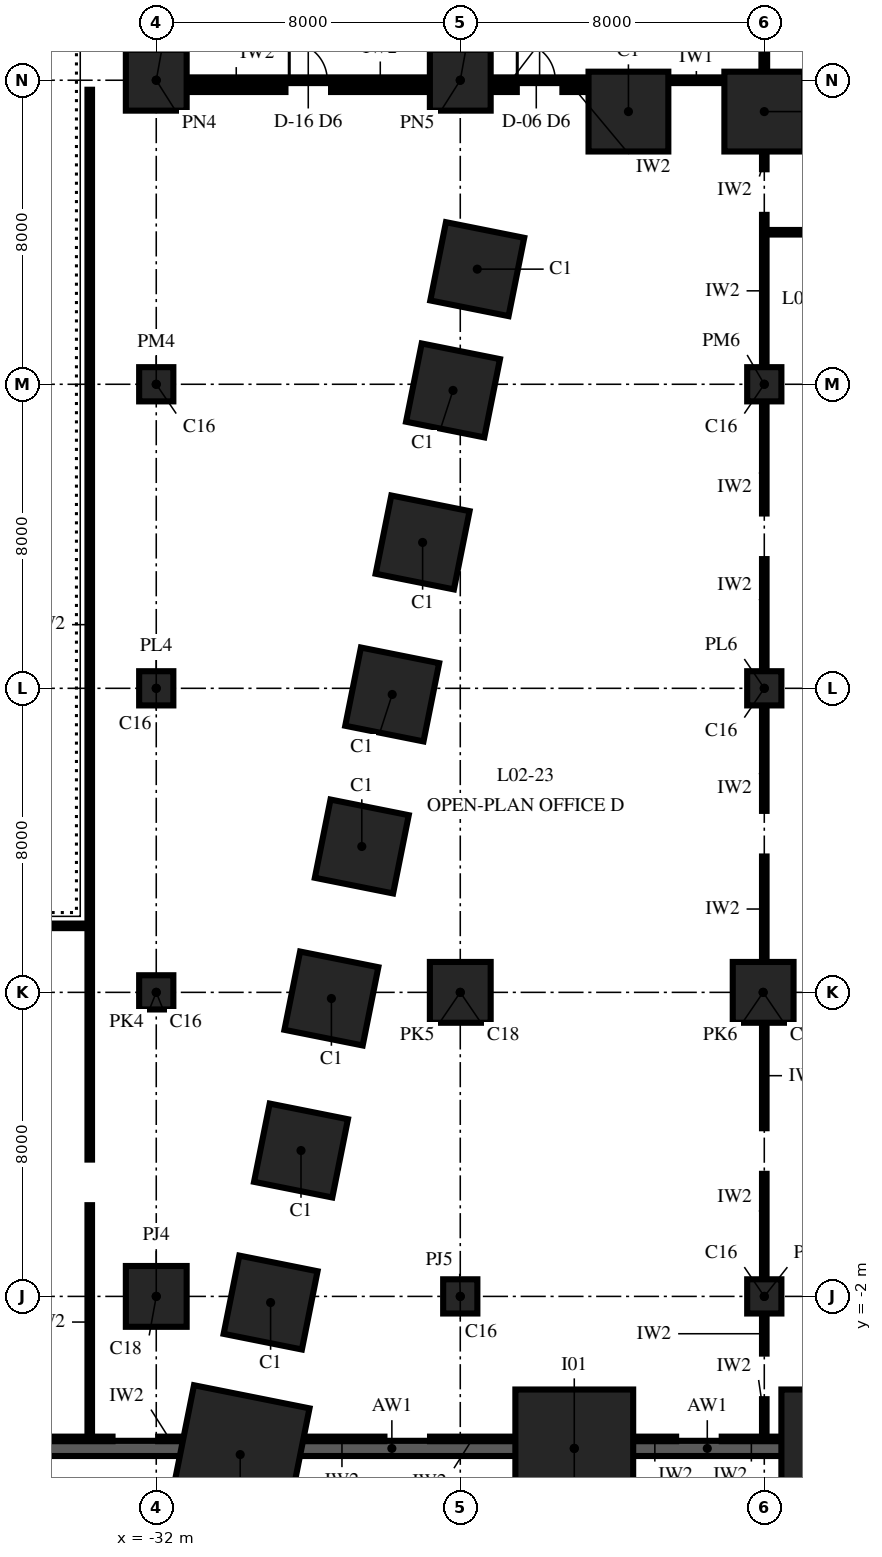
"""IFC4 building model, lengths in metres.
Left out: names, types, materials, properties, quantities, classifications, styles, units other than length and angle.
Written with IfcOpenShell. Run it as: python <this file> out.ifc"""

import sys

from ifc_helpers import new_model, si_unit, direction, frame, frame_2d, origin, origin_2d, place, context, subcontext, project, spatial, rectangle, extrude, element, fill, save


model = new_model("IFC4")
c1 = context("Model", 3, precision=1e-05, world=origin(), true_north=direction((0.0, 1.0)))
c2 = subcontext(c1, "Body", "Model", "MODEL_VIEW")
j1 = project(units=[si_unit("LENGTHUNIT", "METRE"), si_unit("PLANEANGLEUNIT", "RADIAN")], contexts=[c1])
p1 = place(None, origin())
s1 = spatial("IfcSite", under=j1, at=p1, CompositionType="ELEMENT")
p2 = place(p1, origin())
s2 = spatial("IfcBuilding", under=s1, at=p2, CompositionType="ELEMENT")
p3 = place(p2, frame((0.0, 0.0, 12.0)))
s3 = spatial("IfcBuildingStorey", under=s2, at=p3, CompositionType="ELEMENT", Elevation=12.0)
for number, where, z_axis, x_axis in (
    (1, (-16.0, 29.175, 0.0), (0.0, 0.0, 1.0), (-1.0, 0.0, 0.0)),
    (2, (-19.575, 29.175, 0.0), (0.0, 0.0, 1.0), (-1.0, 0.0, 0.0)),
    (3, (-23.553, 25.029, 0.0), (0.0, 0.0, 1.0), (-0.196, -0.981, 0.0)),
    (4, (-24.191, 21.838, 0.0), (0.0, 0.0, 1.0), (-0.196, -0.981, 0.0)),
    (5, (-24.991, 17.838, 0.0), (0.0, 0.0, 1.0), (-0.196, -0.981, 0.0)),
    (6, (-25.791, 13.838, 0.0), (0.0, 0.0, 1.0), (-0.196, -0.981, 0.0)),
    (7, (-26.591, 9.838, 0.0), (0.0, 0.0, 1.0), (-0.196, -0.981, 0.0)),
    (8, (-27.391, 5.838, 0.0), (0.0, 0.0, 1.0), (-0.196, -0.981, 0.0)),
    (9, (-28.191, 1.838, 0.0), (0.0, 0.0, 1.0), (-0.196, -0.981, 0.0)),
    (10, (-28.991, -2.162, 0.0), (0.0, 0.0, 1.0), (-0.196, -0.981, 0.0)),
):
    element("IfcColumn", number, at=place(p3, frame(where, z_axis=z_axis, x_axis=x_axis)), inside=s3, PredefinedType="COLUMN", context=c2, shape_type="SweptSolid", body=[
        extrude(rectangle(XDim=2.1, YDim=2.1, at=origin_2d()), origin(), (0.0, 0.0, 1.0), 7.0),
    ])
for number, where, z_axis, x_axis in (
    (11, (-29.791, -6.162, 0.0), (0.0, 0.0, 1.0), (-0.196, -0.981, 0.0)),
    (12, (-21.0, -6.0, 0.0), (0.0, 0.0, 1.0), (1.0, 0.0, 0.0)),
    (13, (-14.0, -6.0, 0.0), (0.0, 0.0, 1.0), (1.0, 0.0, 0.0)),
):
    element("IfcColumn", number, at=place(p3, frame(where, z_axis=z_axis, x_axis=x_axis)), inside=s3, PredefinedType="COLUMN", context=c2, shape_type="SweptSolid", body=[
        extrude(rectangle(XDim=3.1, YDim=3.1, at=origin_2d()), origin(), (0.0, 0.0, 1.0), 7.0),
    ])
p4 = place(p3, frame((-32.0, -2.0, 0.0), z_axis=(0.0, 0.0, 1.0), x_axis=(1.0, 0.0, 0.0)))
e14 = element("IfcColumn", 14, at=p4, inside=s3, PredefinedType="COLUMN", context=c2, shape_type="SweptSolid", body=[
    extrude(rectangle(XDim=1.6, YDim=1.6, at=origin_2d()), origin(), (0.0, 0.0, 1.0), 7.0),
])
for number, where, z_axis, x_axis in (
    (15, (-32.0, 6.0, 0.0), (0.0, 0.0, 1.0), (1.0, 0.0, 0.0)),
    (16, (-32.0, 14.0, 0.0), (0.0, 0.0, 1.0), (1.0, 0.0, 0.0)),
    (17, (-32.0, 22.0, 0.0), (0.0, 0.0, 1.0), (1.0, 0.0, 0.0)),
):
    element("IfcColumn", number, at=place(p3, frame(where, z_axis=z_axis, x_axis=x_axis)), inside=s3, PredefinedType="COLUMN", context=c2, shape_type="SweptSolid", body=[
        extrude(rectangle(XDim=0.9, YDim=0.9, at=origin_2d()), origin(), (0.0, 0.0, 1.0), 7.0),
    ])
p5 = place(p3, frame((-32.0, 30.0, 0.0), z_axis=(0.0, 0.0, 1.0), x_axis=(1.0, 0.0, 0.0)))
e18 = element("IfcColumn", 18, at=p5, inside=s3, PredefinedType="COLUMN", context=c2, shape_type="SweptSolid", body=[
    extrude(rectangle(XDim=1.6, YDim=1.6, at=origin_2d()), origin(), (0.0, 0.0, 1.0), 7.0),
])
p6 = place(p3, frame((-24.0, -2.0, 0.0), z_axis=(0.0, 0.0, 1.0), x_axis=(1.0, 0.0, 0.0)))
e19 = element("IfcColumn", 19, at=p6, inside=s3, PredefinedType="COLUMN", context=c2, shape_type="SweptSolid", body=[
    extrude(rectangle(XDim=0.9, YDim=0.9, at=origin_2d()), origin(), (0.0, 0.0, 1.0), 7.0),
])
for number, where, z_axis, x_axis in (
    (20, (-24.0, 6.0, 0.0), (0.0, 0.0, 1.0), (1.0, 0.0, 0.0)),
    (21, (-24.0, 30.0, 0.0), (0.0, 0.0, 1.0), (1.0, 0.0, 0.0)),
):
    element("IfcColumn", number, at=place(p3, frame(where, z_axis=z_axis, x_axis=x_axis)), inside=s3, PredefinedType="COLUMN", context=c2, shape_type="SweptSolid", body=[
        extrude(rectangle(XDim=1.6, YDim=1.6, at=origin_2d()), origin(), (0.0, 0.0, 1.0), 7.0),
    ])
p7 = place(p3, frame((-16.0, -2.0, 0.0), z_axis=(0.0, 0.0, 1.0), x_axis=(1.0, 0.0, 0.0)))
e22 = element("IfcColumn", 22, at=p7, inside=s3, PredefinedType="COLUMN", context=c2, shape_type="SweptSolid", body=[
    extrude(rectangle(XDim=0.9, YDim=0.9, at=origin_2d()), origin(), (0.0, 0.0, 1.0), 7.0),
])
p8 = place(p3, frame((-16.03, 6.0, 0.0), z_axis=(0.0, 0.0, 1.0), x_axis=(1.0, 0.0, 0.0)))
e23 = element("IfcColumn", 23, at=p8, inside=s3, PredefinedType="COLUMN", context=c2, shape_type="SweptSolid", body=[
    extrude(rectangle(XDim=1.6, YDim=1.6, at=origin_2d()), origin(), (0.0, 0.0, 1.0), 7.0),
])
for number, where, z_axis, x_axis in (
    (24, (-16.0, 14.0, 0.0), (0.0, 0.0, 1.0), (1.0, 0.0, 0.0)),
    (25, (-16.0, 22.0, 0.0), (0.0, 0.0, 1.0), (1.0, 0.0, 0.0)),
):
    element("IfcColumn", number, at=place(p3, frame(where, z_axis=z_axis, x_axis=x_axis)), inside=s3, PredefinedType="COLUMN", context=c2, shape_type="SweptSolid", body=[
        extrude(rectangle(XDim=0.9, YDim=0.9, at=origin_2d()), origin(), (0.0, 0.0, 1.0), 7.0),
    ])
p9 = place(p3, frame((-48.3, -6.0, 0.0), z_axis=(0.0, 0.0, 1.0), x_axis=(1.0, 0.0, 0.0)))
e26 = element("IfcWall", 26, at=p9, inside=s3, PredefinedType="SHEAR", context=c2, shape_type="SweptSolid", body=[
    extrude(rectangle(XDim=17.05, YDim=0.4, at=frame_2d((8.525, 0.0))), origin(), (0.0, 0.0, 1.0), 7.0),
])
p10 = place(p3, frame((-29.95, -6.0, 0.0), z_axis=(0.0, 0.0, 1.0), x_axis=(1.0, 0.0, 0.0)))
e27 = element("IfcWall", 27, at=p10, inside=s3, PredefinedType="SHEAR", context=c2, shape_type="SweptSolid", body=[
    extrude(rectangle(XDim=8.3, YDim=0.4, at=frame_2d((4.15, 0.0))), origin(), (0.0, 0.0, 1.0), 7.0),
])
p11 = place(p3, frame((-20.35, -6.0, 0.0), z_axis=(0.0, 0.0, 1.0), x_axis=(1.0, 0.0, 0.0)))
e28 = element("IfcWall", 28, at=p11, inside=s3, PredefinedType="SHEAR", context=c2, shape_type="SweptSolid", body=[
    extrude(rectangle(XDim=5.7, YDim=0.4, at=frame_2d((2.85, 0.0))), origin(), (0.0, 0.0, 1.0), 7.0),
])
p12 = place(p3, frame((-33.75, -5.75, 0.0), z_axis=(0.0, 0.0, 1.0), x_axis=(0.0, 1.0, 0.0)))
e29 = element("IfcWall", 29, at=p12, inside=s3, PredefinedType="PARTITIONING", context=c2, shape_type="SweptSolid", body=[
    extrude(rectangle(XDim=6.15, YDim=0.12, at=frame_2d((3.075, 0.0))), origin(), (0.0, 0.0, 1.0), 6.7),
])
p13 = place(p3, frame((-33.75, 1.6, 0.0), z_axis=(0.0, 0.0, 1.0), x_axis=(0.0, 1.0, 0.0)))
e30 = element("IfcWall", 30, at=p13, inside=s3, PredefinedType="PARTITIONING", context=c2, shape_type="SweptSolid", body=[
    extrude(rectangle(XDim=28.15, YDim=0.12, at=frame_2d((14.075, 0.0))), origin(), (0.0, 0.0, 1.0), 6.7),
])
for number, where, z_axis, x_axis in (
    (31, (-16.0, -5.75, 0.0), (0.0, 0.0, 1.0), (0.0, 1.0, 0.0)),
    (32, (-16.0, -3.505, 0.0), (0.0, 0.0, 1.0), (0.0, 1.0, 0.0)),
):
    element("IfcWall", number, at=place(p3, frame(where, z_axis=z_axis, x_axis=x_axis)), inside=s3, PredefinedType="PARTITIONING", context=c2, shape_type="SweptSolid", body=[
        extrude(rectangle(XDim=1.045, YDim=0.12, at=frame_2d((0.522, 0.0))), origin(), (0.0, 0.0, 1.0), 6.7),
    ])
p14 = place(p3, frame((-16.0, -1.54, 0.0), z_axis=(0.0, 0.0, 1.0), x_axis=(0.0, 1.0, 0.0)))
e33 = element("IfcWall", 33, at=p14, inside=s3, PredefinedType="PARTITIONING", context=c2, shape_type="SweptSolid", body=[
    extrude(rectangle(XDim=2.765, YDim=0.12, at=frame_2d((1.383, 0.0))), origin(), (0.0, 0.0, 1.0), 6.05),
])
for number, where, z_axis, x_axis in (
    (34, (-16.0, 2.425, 0.0), (0.0, 0.0, 1.0), (0.0, 1.0, 0.0)),
    (35, (-16.0, 6.81, 0.0), (0.0, 0.0, 1.0), (0.0, 1.0, 0.0)),
):
    element("IfcWall", number, at=place(p3, frame(where, z_axis=z_axis, x_axis=x_axis)), inside=s3, PredefinedType="PARTITIONING", context=c2, shape_type="SweptSolid", body=[
        extrude(rectangle(XDim=2.765, YDim=0.12, at=frame_2d((1.382, 0.0))), origin(), (0.0, 0.0, 1.0), 6.05),
    ])
p15 = place(p3, frame((-16.0, 10.775, 0.0), z_axis=(0.0, 0.0, 1.0), x_axis=(0.0, 1.0, 0.0)))
e36 = element("IfcWall", 36, at=p15, inside=s3, PredefinedType="PARTITIONING", context=c2, shape_type="SweptSolid", body=[
    extrude(rectangle(XDim=2.765, YDim=0.12, at=frame_2d((1.383, 0.0))), origin(), (0.0, 0.0, 1.0), 6.05),
])
for number, where, z_axis, x_axis in (
    (37, (-16.0, 14.46, 0.0), (0.0, 0.0, 1.0), (0.0, 1.0, 0.0)),
    (38, (-16.0, 18.6, 0.0), (0.0, 0.0, 1.0), (0.0, 1.0, 0.0)),
):
    element("IfcWall", number, at=place(p3, frame(where, z_axis=z_axis, x_axis=x_axis)), inside=s3, PredefinedType="PARTITIONING", context=c2, shape_type="SweptSolid", body=[
        extrude(rectangle(XDim=2.94, YDim=0.12, at=frame_2d((1.47, 0.0))), origin(), (0.0, 0.0, 1.0), 6.05),
    ])
p16 = place(p3, frame((-16.0, 22.46, 0.0), z_axis=(0.0, 0.0, 1.0), x_axis=(0.0, 1.0, 0.0)))
e39 = element("IfcWall", 39, at=p16, inside=s3, PredefinedType="PARTITIONING", context=c2, shape_type="SweptSolid", body=[
    extrude(rectangle(XDim=3.998, YDim=0.12, at=frame_2d((1.999, 0.0))), origin(), (0.0, 0.0, 1.0), 6.7),
])
p17 = place(p3, frame((-16.0, 27.657, 0.0), z_axis=(0.0, 0.0, 1.0), x_axis=(0.0, 1.0, 0.0)))
e40 = element("IfcWall", 40, at=p17, inside=s3, PredefinedType="PARTITIONING", context=c2, shape_type="SweptSolid", body=[
    extrude(rectangle(XDim=0.458, YDim=0.12, at=frame_2d((0.229, 0.0))), origin(), (0.0, 0.0, 1.0), 6.7),
])
p18 = place(p3, frame((-16.0, 30.235, 0.0), z_axis=(0.0, 0.0, 1.0), x_axis=(0.0, 1.0, 0.0)))
e41 = element("IfcWall", 41, at=p18, inside=s3, PredefinedType="PARTITIONING", context=c2, shape_type="SweptSolid", body=[
    extrude(rectangle(XDim=7.305, YDim=0.15, at=frame_2d((3.652, 0.0))), origin(), (0.0, 0.0, 1.0), 6.7),
])
p19 = place(p3, frame((-55.75, -5.75, 0.0), z_axis=(0.0, 0.0, 1.0), x_axis=(1.0, 0.0, 0.0)))
e42 = element("IfcWall", 42, at=p19, inside=s3, PredefinedType="PARTITIONING", context=c2, shape_type="SweptSolid", body=[
    extrude(rectangle(XDim=22.6, YDim=0.12, at=frame_2d((11.3, 0.0))), origin(), (0.0, 0.0, 1.0), 6.7),
])
p20 = place(p3, frame((-31.95, -5.75, 0.0), z_axis=(0.0, 0.0, 1.0), x_axis=(1.0, 0.0, 0.0)))
e43 = element("IfcWall", 43, at=p20, inside=s3, PredefinedType="PARTITIONING", context=c2, shape_type="SweptSolid", body=[
    extrude(rectangle(XDim=0.599, YDim=0.12, at=frame_2d((0.3, 0.0))), origin(), (0.0, 0.0, 1.0), 6.7),
])
for number, where, z_axis, x_axis in (
    (44, (-28.231, -5.75, 0.0), (0.0, 0.0, 1.0), (1.0, 0.0, 0.0)),
    (45, (-24.795, -5.75, 0.0), (0.0, 0.0, 1.0), (1.0, 0.0, 0.0)),
):
    element("IfcWall", number, at=place(p3, frame(where, z_axis=z_axis, x_axis=x_axis)), inside=s3, PredefinedType="PARTITIONING", context=c2, shape_type="SweptSolid", body=[
        extrude(rectangle(XDim=2.235, YDim=0.12, at=frame_2d((1.118, 0.0))), origin(), (0.0, 0.0, 1.0), 6.7),
    ])
p21 = place(p3, frame((-19.44, -5.75, 0.0), z_axis=(0.0, 0.0, 1.0), x_axis=(1.0, 0.0, 0.0)))
e46 = element("IfcWall", 46, at=p21, inside=s3, PredefinedType="PARTITIONING", context=c2, shape_type="SweptSolid", body=[
    extrude(rectangle(XDim=1.12, YDim=0.12, at=frame_2d((0.56, 0.0))), origin(), (0.0, 0.0, 1.0), 6.7),
])
p22 = place(p3, frame((-17.12, -5.75, 0.0), z_axis=(0.0, 0.0, 1.0), x_axis=(1.0, 0.0, 0.0)))
e47 = element("IfcWall", 47, at=p22, inside=s3, PredefinedType="PARTITIONING", context=c2, shape_type="SweptSolid", body=[
    extrude(rectangle(XDim=1.56, YDim=0.12, at=frame_2d((0.78, 0.0))), origin(), (0.0, 0.0, 1.0), 6.7),
])
p23 = place(p3, frame((-44.15, 7.75, 0.0), z_axis=(0.0, 0.0, 1.0), x_axis=(1.0, 0.0, 0.0)))
e48 = element("IfcWall", 48, at=p23, inside=s3, PredefinedType="PARTITIONING", context=c2, shape_type="SweptSolid", body=[
    extrude(rectangle(XDim=10.4, YDim=0.12, at=frame_2d((5.2, 0.0))), origin(), (0.0, 0.0, 1.0), 6.7),
])
p24 = place(p3, frame((-16.0, 26.0, 0.0), z_axis=(0.0, 0.0, 1.0), x_axis=(1.0, 0.0, 0.0)))
e49 = element("IfcWall", 49, at=p24, inside=s3, PredefinedType="PARTITIONING", context=c2, shape_type="SweptSolid", body=[
    extrude(rectangle(XDim=15.4, YDim=0.12, at=frame_2d((7.7, 0.0))), origin(), (0.0, 0.0, 1.0), 6.7),
])
for number, where, z_axis, x_axis in (
    (50, (-31.19, 29.75, 0.0), (0.0, 0.0, 1.0), (1.0, 0.0, 0.0)),
    (51, (-27.4, 29.75, 0.0), (0.0, 0.0, 1.0), (1.0, 0.0, 0.0)),
):
    element("IfcWall", number, at=place(p3, frame(where, z_axis=z_axis, x_axis=x_axis)), inside=s3, PredefinedType="PARTITIONING", context=c2, shape_type="SweptSolid", body=[
        extrude(rectangle(XDim=2.59, YDim=0.12, at=frame_2d((1.295, 0.0))), origin(), (0.0, 0.0, 1.0), 5.099),
    ])
for number, where, z_axis, x_axis in (
    (52, (-23.19, 29.75, 0.0), (0.0, 0.0, 1.0), (1.0, 0.0, 0.0)),
    (53, (-21.312, 29.75, 0.0), (0.0, 0.0, 1.0), (1.0, 0.0, 0.0)),
):
    element("IfcWall", number, at=place(p3, frame(where, z_axis=z_axis, x_axis=x_axis)), inside=s3, PredefinedType="PARTITIONING", context=c2, shape_type="SweptSolid", body=[
        extrude(rectangle(XDim=0.677, YDim=0.12, at=frame_2d((0.339, 0.0))), origin(), (0.0, 0.0, 1.0), 6.7),
    ])
p25 = place(p3, frame((-31.19, 30.0, 0.0), z_axis=(0.0, 0.0, 1.0), x_axis=(1.0, 0.0, 0.0)))
e54 = element("IfcWall", 54, at=p25, inside=s3, PredefinedType="PARTITIONING", context=c2, shape_type="SweptSolid", body=[
    extrude(rectangle(XDim=6.38, YDim=0.15, at=frame_2d((3.19, 0.0))), origin(), (0.0, 0.0, 1.0), 5.099),
])
p26 = place(p25, frame((2.69, 0.0, 0.0)))
e55 = element("IfcOpeningElement", 55, at=p26, cuts=e54, PredefinedType="OPENING", context=c2, shape_type="SweptSolid", body=[
    extrude(rectangle(XDim=1.0, YDim=2.1, at=frame_2d((0.5, 1.05))), frame((0.0, 0.09, 0.0), z_axis=(0.0, -1.0, 0.0), x_axis=(1.0, 0.0, 0.0)), (0.0, 0.0, 1.0), 0.18),
])
p27 = place(p3, frame((-23.19, 30.0, 0.0), z_axis=(0.0, 0.0, 1.0), x_axis=(1.0, 0.0, 0.0)))
e56 = element("IfcWall", 56, at=p27, inside=s3, PredefinedType="PARTITIONING", context=c2, shape_type="SweptSolid", body=[
    extrude(rectangle(XDim=2.555, YDim=0.15, at=frame_2d((1.277, 0.0))), origin(), (0.0, 0.0, 1.0), 6.7),
])
p28 = place(p27, frame((0.69, 0.0, 0.0)))
e57 = element("IfcOpeningElement", 57, at=p28, cuts=e56, PredefinedType="OPENING", context=c2, shape_type="SweptSolid", body=[
    extrude(rectangle(XDim=1.0, YDim=2.1, at=frame_2d((0.5, 1.05))), frame((0.0, 0.09, 0.0), z_axis=(0.0, -1.0, 0.0), x_axis=(1.0, 0.0, 0.0)), (0.0, 0.0, 1.0), 0.18),
])
p29 = place(p3, frame((-18.515, 30.0, 0.0), z_axis=(0.0, 0.0, 1.0), x_axis=(1.0, 0.0, 0.0)))
e58 = element("IfcWall", 58, at=p29, inside=s3, PredefinedType="PARTITIONING", context=c2, shape_type="SweptSolid", body=[
    extrude(rectangle(XDim=1.455, YDim=0.15, at=frame_2d((0.728, 0.0))), origin(), (0.0, 0.0, 1.0), 6.7),
])
p30 = place(p26, origin())
e59 = element("IfcDoor", 59, at=p30, inside=s3, OperationType="SINGLE_SWING_LEFT", PredefinedType="DOOR", context=c2, shape_type="SweptSolid", body=[
    extrude(rectangle(XDim=1.0, YDim=2.1, at=frame_2d((0.5, 1.05))), frame((0.0, 0.075, 0.0), z_axis=(0.0, -1.0, 0.0), x_axis=(1.0, 0.0, 0.0)), (0.0, 0.0, 1.0), 0.149),
])
fill(e55, e59)
p31 = place(p28, origin())
e60 = element("IfcDoor", 60, at=p31, inside=s3, OperationType="SINGLE_SWING_LEFT", PredefinedType="DOOR", context=c2, shape_type="SweptSolid", body=[
    extrude(rectangle(XDim=1.0, YDim=2.1, at=frame_2d((0.5, 1.05))), frame((0.0, 0.075, 0.0), z_axis=(0.0, -1.0, 0.0), x_axis=(1.0, 0.0, 0.0)), (0.0, 0.0, 1.0), 0.149),
])
fill(e57, e60)
save(model, sys.argv[1])
